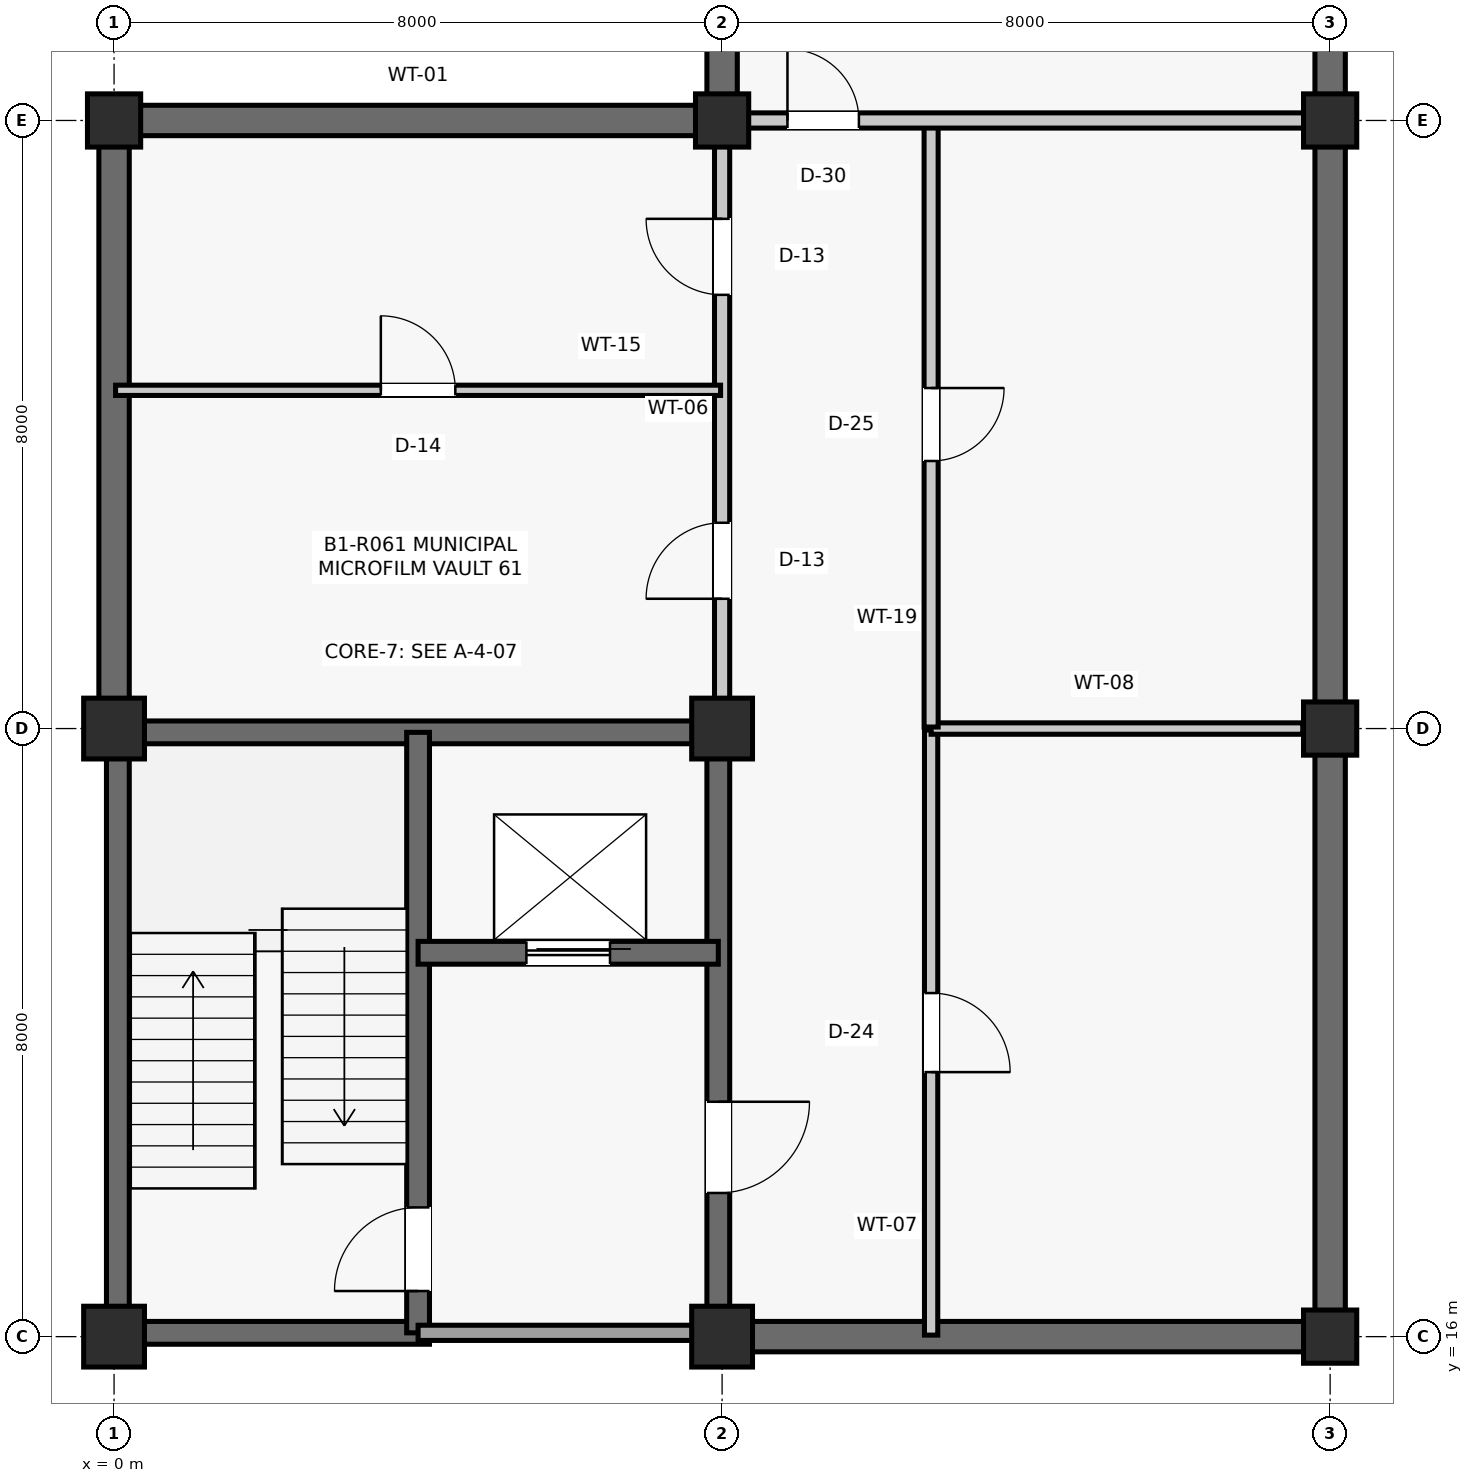
"""IFC4 building model, lengths in metres.
Left out: names, types, materials, properties, quantities, classifications, styles, units other than length and angle.
Written with IfcOpenShell. Run it as: python <this file> out.ifc"""

import sys

from ifc_helpers import new_model, si_unit, direction, frame, frame_2d, origin, origin_2d, place, context, subcontext, project, spatial, rectangle, extrude, element, fill, save


model = new_model("IFC4")
c1 = context("Model", 3, precision=1e-05, world=origin(), true_north=direction((0.0, 1.0)))
c2 = subcontext(c1, "Body", "Model", "MODEL_VIEW")
j1 = project(units=[si_unit("LENGTHUNIT", "METRE"), si_unit("PLANEANGLEUNIT", "RADIAN")], contexts=[c1])
p1 = place(None, origin())
s1 = spatial("IfcSite", under=j1, at=p1, CompositionType="ELEMENT")
p2 = place(p1, origin())
s2 = spatial("IfcBuilding", under=s1, at=p2, CompositionType="ELEMENT")
p3 = place(p2, frame((0.0, 0.0, -4.29)))
s3 = spatial("IfcBuildingStorey", under=s2, at=p3, CompositionType="ELEMENT", Elevation=-4.29)
for number, where, z_axis, x_axis in (
    (1, (0.0, 16.0, 0.0), (0.0, 0.0, 1.0), (1.0, 0.0, 0.0)),
    (2, (0.0, 24.0, 0.0), (0.0, 0.0, 1.0), (1.0, 0.0, 0.0)),
):
    element("IfcColumn", number, at=place(p3, frame(where, z_axis=z_axis, x_axis=x_axis)), inside=s3, PredefinedType="COLUMN", context=c2, shape_type="SweptSolid", body=[
        extrude(rectangle(XDim=0.8, YDim=0.8, at=origin_2d()), origin(), (0.0, 0.0, 1.0), 4.29),
    ])
p4 = place(p3, frame((0.0, 32.0, 0.0), z_axis=(0.0, 0.0, 1.0), x_axis=(1.0, 0.0, 0.0)))
e3 = element("IfcColumn", 3, at=p4, inside=s3, PredefinedType="COLUMN", context=c2, shape_type="SweptSolid", body=[
    extrude(rectangle(XDim=0.7, YDim=0.7, at=origin_2d()), origin(), (0.0, 0.0, 1.0), 4.29),
])
for number, where, z_axis, x_axis in (
    (4, (8.0, 16.0, 0.0), (0.0, 0.0, 1.0), (1.0, 0.0, 0.0)),
    (5, (8.0, 24.0, 0.0), (0.0, 0.0, 1.0), (1.0, 0.0, 0.0)),
):
    element("IfcColumn", number, at=place(p3, frame(where, z_axis=z_axis, x_axis=x_axis)), inside=s3, PredefinedType="COLUMN", context=c2, shape_type="SweptSolid", body=[
        extrude(rectangle(XDim=0.8, YDim=0.8, at=origin_2d()), origin(), (0.0, 0.0, 1.0), 4.29),
    ])
for number, where, z_axis, x_axis in (
    (6, (8.0, 32.0, 0.0), (0.0, 0.0, 1.0), (1.0, 0.0, 0.0)),
    (7, (16.0, 16.0, 0.0), (0.0, 0.0, 1.0), (1.0, 0.0, 0.0)),
    (8, (16.0, 24.0, 0.0), (0.0, 0.0, 1.0), (1.0, 0.0, 0.0)),
    (9, (16.0, 32.0, 0.0), (0.0, 0.0, 1.0), (1.0, 0.0, 0.0)),
):
    element("IfcColumn", number, at=place(p3, frame(where, z_axis=z_axis, x_axis=x_axis)), inside=s3, PredefinedType="COLUMN", context=c2, shape_type="SweptSolid", body=[
        extrude(rectangle(XDim=0.7, YDim=0.7, at=origin_2d()), origin(), (0.0, 0.0, 1.0), 4.29),
    ])
p5 = place(p3, frame((0.335, 32.0, 0.0), z_axis=(0.0, 0.0, 1.0), x_axis=(1.0, 0.0, 0.0)))
e10 = element("IfcWall", 10, at=p5, inside=s3, PredefinedType="SHEAR", context=c2, shape_type="SweptSolid", body=[
    extrude(rectangle(XDim=7.33, YDim=0.4, at=frame_2d((3.665, 0.0))), origin(), (0.0, 0.0, 1.0), 3.324),
])
p6 = place(p3, frame((0.0, 24.385, 0.0), z_axis=(0.0, 0.0, 1.0), x_axis=(0.0, 1.0, 0.0)))
e11 = element("IfcWall", 11, at=p6, inside=s3, PredefinedType="SHEAR", context=c2, shape_type="SweptSolid", body=[
    extrude(rectangle(XDim=7.28, YDim=0.4, at=frame_2d((3.64, 0.0))), origin(), (0.0, 0.0, 1.0), 3.604),
])
p7 = place(p3, frame((8.385, 16.0, 0.0), z_axis=(0.0, 0.0, 1.0), x_axis=(1.0, 0.0, 0.0)))
e12 = element("IfcWall", 12, at=p7, inside=s3, PredefinedType="SHEAR", context=c2, shape_type="SweptSolid", body=[
    extrude(rectangle(XDim=7.28, YDim=0.4, at=frame_2d((3.64, 0.0))), origin(), (0.0, 0.0, 1.0), 3.401),
])
p8 = place(p3, frame((16.0, 16.335, 0.0), z_axis=(0.0, 0.0, 1.0), x_axis=(0.0, 1.0, 0.0)))
e13 = element("IfcWall", 13, at=p8, inside=s3, PredefinedType="SHEAR", context=c2, shape_type="SweptSolid", body=[
    extrude(rectangle(XDim=7.33, YDim=0.4, at=frame_2d((3.665, 0.0))), origin(), (0.0, 0.0, 1.0), 3.4),
])
for number, where, z_axis, x_axis in (
    (14, (16.0, 24.335, 0.0), (0.0, 0.0, 1.0), (0.0, 1.0, 0.0)),
    (15, (8.0, 32.335, 0.0), (0.0, 0.0, 1.0), (0.0, 1.0, 0.0)),
):
    element("IfcWall", number, at=place(p3, frame(where, z_axis=z_axis, x_axis=x_axis)), inside=s3, PredefinedType="SHEAR", context=c2, shape_type="SweptSolid", body=[
        extrude(rectangle(XDim=7.33, YDim=0.4, at=frame_2d((3.665, 0.0))), origin(), (0.0, 0.0, 1.0), 3.409),
    ])
p9 = place(p3, frame((16.0, 32.335, 0.0), z_axis=(0.0, 0.0, 1.0), x_axis=(0.0, 1.0, 0.0)))
e16 = element("IfcWall", 16, at=p9, inside=s3, PredefinedType="SHEAR", context=c2, shape_type="SweptSolid", body=[
    extrude(rectangle(XDim=7.33, YDim=0.4, at=frame_2d((3.665, 0.0))), origin(), (0.0, 0.0, 1.0), 3.401),
])
for number, where, z_axis, x_axis in (
    (17, (0.05, 16.29, 0.0), (0.0, 0.0, 1.0), (0.0, 1.0, 0.0)),
    (18, (0.29, 23.95, 0.0), (0.0, 0.0, 1.0), (1.0, 0.0, 0.0)),
):
    element("IfcWall", number, at=place(p3, frame(where, z_axis=z_axis, x_axis=x_axis)), inside=s3, PredefinedType="SHEAR", context=c2, shape_type="SweptSolid", body=[
        extrude(rectangle(XDim=7.42, YDim=0.3, at=frame_2d((3.71, 0.0))), origin(), (0.0, 0.0, 1.0), 4.015),
    ])
p10 = place(p3, frame((7.95, 16.29, 0.0), z_axis=(0.0, 0.0, 1.0), x_axis=(0.0, 1.0, 0.0)))
e19 = element("IfcWall", 19, at=p10, inside=s3, PredefinedType="SHEAR", context=c2, shape_type="SweptSolid", body=[
    extrude(rectangle(XDim=7.42, YDim=0.3, at=frame_2d((3.71, 0.0))), origin(), (0.0, 0.0, 1.0), 4.015),
])
p11 = place(p10, frame((1.6, 0.0, 0.0)))
e20 = element("IfcOpeningElement", 20, at=p11, cuts=e19, PredefinedType="OPENING", context=c2, shape_type="SweptSolid", body=[
    extrude(rectangle(XDim=1.2, YDim=2.15, at=frame_2d((0.6, 1.075))), frame((0.0, 0.16, 0.0), z_axis=(0.0, -1.0, 0.0), x_axis=(1.0, 0.0, 0.0)), (0.0, 0.0, 1.0), 0.32),
])
p12 = place(p3, frame((0.29, 16.05, 0.0), z_axis=(0.0, 0.0, 1.0), x_axis=(1.0, 0.0, 0.0)))
e21 = element("IfcWall", 21, at=p12, inside=s3, PredefinedType="SHEAR", context=c2, shape_type="SweptSolid", body=[
    extrude(rectangle(XDim=3.86, YDim=0.3, at=frame_2d((1.93, 0.0))), origin(), (0.0, 0.0, 1.0), 4.015),
])
p13 = place(p3, frame((4.0, 16.05, 0.0), z_axis=(0.0, 0.0, 1.0), x_axis=(0.0, 1.0, 0.0)))
e22 = element("IfcWall", 22, at=p13, inside=s3, PredefinedType="SHEAR", context=c2, shape_type="SweptSolid", body=[
    extrude(rectangle(XDim=7.9, YDim=0.3, at=frame_2d((3.95, 0.0))), origin(), (0.0, 0.0, 1.0), 4.015),
])
p14 = place(p13, frame((0.55, 0.0, 0.0)))
e23 = element("IfcOpeningElement", 23, at=p14, cuts=e22, PredefinedType="OPENING", context=c2, shape_type="SweptSolid", body=[
    extrude(rectangle(XDim=1.1, YDim=2.15, at=frame_2d((0.55, 1.075))), frame((0.0, 0.16, 0.0), z_axis=(0.0, -1.0, 0.0), x_axis=(1.0, 0.0, 0.0)), (0.0, 0.0, 1.0), 0.32),
])
p15 = place(p3, frame((4.0, 21.05, 0.0), z_axis=(0.0, 0.0, 1.0), x_axis=(1.0, 0.0, 0.0)))
e24 = element("IfcWall", 24, at=p15, inside=s3, PredefinedType="SHEAR", context=c2, shape_type="SweptSolid", body=[
    extrude(rectangle(XDim=3.95, YDim=0.3, at=frame_2d((1.975, 0.0))), origin(), (0.0, 0.0, 1.0), 4.015),
])
p16 = place(p15, frame((1.425, 0.0, 0.0)))
e25 = element("IfcOpeningElement", 25, at=p16, cuts=e24, PredefinedType="OPENING", context=c2, shape_type="SweptSolid", body=[
    extrude(rectangle(XDim=1.1, YDim=2.2, at=frame_2d((0.55, 1.1))), frame((0.0, 0.16, 0.0), z_axis=(0.0, -1.0, 0.0), x_axis=(1.0, 0.0, 0.0)), (0.0, 0.0, 1.0), 0.32),
])
p17 = place(p3, frame((4.0, 16.05, 0.0), z_axis=(0.0, 0.0, 1.0), x_axis=(1.0, 0.0, 0.0)))
e26 = element("IfcWall", 26, at=p17, inside=s3, PredefinedType="PARTITIONING", context=c2, shape_type="SweptSolid", body=[
    extrude(rectangle(XDim=3.61, YDim=0.2, at=frame_2d((1.805, 0.0))), origin(), (0.0, 0.0, 1.0), 3.326),
])
p18 = place(p3, frame((10.75, 16.02, 0.0), z_axis=(0.0, 0.0, 1.0), x_axis=(0.0, 1.0, 0.0)))
e27 = element("IfcWall", 27, at=p18, inside=s3, PredefinedType="PARTITIONING", context=c2, shape_type="SweptSolid", body=[
    extrude(rectangle(XDim=7.96, YDim=0.175, at=frame_2d((3.98, 0.0))), origin(), (0.0, 0.0, 1.0), 3.317),
])
p19 = place(p18, frame((3.46, 0.0, 0.0)))
e28 = element("IfcOpeningElement", 28, at=p19, cuts=e27, PredefinedType="OPENING", context=c2, shape_type="SweptSolid", body=[
    extrude(rectangle(XDim=1.04, YDim=2.18, at=frame_2d((0.52, 1.09))), frame((0.0, 0.097, 0.0), z_axis=(0.0, -1.0, 0.0), x_axis=(1.0, 0.0, 0.0)), (0.0, 0.0, 1.0), 0.195),
])
p20 = place(p3, frame((10.75, 24.0, 0.0), z_axis=(0.0, 0.0, 1.0), x_axis=(1.0, 0.0, 0.0)))
e29 = element("IfcWall", 29, at=p20, inside=s3, PredefinedType="PARTITIONING", context=c2, shape_type="SweptSolid", body=[
    extrude(rectangle(XDim=4.89, YDim=0.15, at=frame_2d((2.445, 0.0))), origin(), (0.0, 0.0, 1.0), 3.317),
])
p21 = place(p3, frame((10.75, 24.02, 0.0), z_axis=(0.0, 0.0, 1.0), x_axis=(0.0, 1.0, 0.0)))
e30 = element("IfcWall", 30, at=p21, inside=s3, PredefinedType="PARTITIONING", context=c2, shape_type="SweptSolid", body=[
    extrude(rectangle(XDim=7.96, YDim=0.185, at=frame_2d((3.98, 0.0))), origin(), (0.0, 0.0, 1.0), 3.317),
])
p22 = place(p21, frame((3.5, 0.0, 0.0)))
e31 = element("IfcOpeningElement", 31, at=p22, cuts=e30, PredefinedType="OPENING", context=c2, shape_type="SweptSolid", body=[
    extrude(rectangle(XDim=0.96, YDim=2.14, at=frame_2d((0.48, 1.07))), frame((0.0, 0.103, 0.0), z_axis=(0.0, -1.0, 0.0), x_axis=(1.0, 0.0, 0.0)), (0.0, 0.0, 1.0), 0.205),
])
p23 = place(p3, frame((8.0, 24.39, 0.0), z_axis=(0.0, 0.0, 1.0), x_axis=(0.0, 1.0, 0.0)))
e32 = element("IfcWall", 32, at=p23, inside=s3, PredefinedType="PARTITIONING", context=c2, shape_type="SweptSolid", body=[
    extrude(rectangle(XDim=7.27, YDim=0.2, at=frame_2d((3.635, 0.0))), origin(), (0.0, 0.0, 1.0), 3.393),
])
p24 = place(p23, frame((1.317, 0.0, 0.0)))
e33 = element("IfcOpeningElement", 33, at=p24, cuts=e32, PredefinedType="OPENING", context=c2, shape_type="SweptSolid", body=[
    extrude(rectangle(XDim=1.0, YDim=2.15, at=frame_2d((0.5, 1.075))), frame((0.0, 0.11, 0.0), z_axis=(0.0, -1.0, 0.0), x_axis=(1.0, 0.0, 0.0)), (0.0, 0.0, 1.0), 0.22),
])
p25 = place(p23, frame((5.316, 0.0, 0.0)))
e34 = element("IfcOpeningElement", 34, at=p25, cuts=e32, PredefinedType="OPENING", context=c2, shape_type="SweptSolid", body=[
    extrude(rectangle(XDim=1.0, YDim=2.15, at=frame_2d((0.5, 1.075))), frame((0.0, 0.11, 0.0), z_axis=(0.0, -1.0, 0.0), x_axis=(1.0, 0.0, 0.0)), (0.0, 0.0, 1.0), 0.22),
])
p26 = place(p3, frame((8.34, 32.0, 0.0), z_axis=(0.0, 0.0, 1.0), x_axis=(1.0, 0.0, 0.0)))
e35 = element("IfcWall", 35, at=p26, inside=s3, PredefinedType="PARTITIONING", context=c2, shape_type="SweptSolid", body=[
    extrude(rectangle(XDim=7.32, YDim=0.2, at=frame_2d((3.66, 0.0))), origin(), (0.0, 0.0, 1.0), 3.393),
])
p27 = place(p26, frame((0.52, 0.0, 0.0)))
e36 = element("IfcOpeningElement", 36, at=p27, cuts=e35, PredefinedType="OPENING", context=c2, shape_type="SweptSolid", body=[
    extrude(rectangle(XDim=0.94, YDim=2.12, at=frame_2d((0.47, 1.06))), frame((0.0, 0.11, 0.0), z_axis=(0.0, -1.0, 0.0), x_axis=(1.0, 0.0, 0.0)), (0.0, 0.0, 1.0), 0.22),
])
p28 = place(p3, frame((0.02, 28.45, 0.0), z_axis=(0.0, 0.0, 1.0), x_axis=(1.0, 0.0, 0.0)))
e37 = element("IfcWall", 37, at=p28, inside=s3, PredefinedType="PARTITIONING", context=c2, shape_type="SweptSolid", body=[
    extrude(rectangle(XDim=7.96, YDim=0.135, at=frame_2d((3.98, 0.0))), origin(), (0.0, 0.0, 1.0), 3.393),
])
p29 = place(p28, frame((3.49, 0.0, 0.0)))
e38 = element("IfcOpeningElement", 38, at=p29, cuts=e37, PredefinedType="OPENING", context=c2, shape_type="SweptSolid", body=[
    extrude(rectangle(XDim=0.98, YDim=2.15, at=frame_2d((0.49, 1.075))), frame((0.0, 0.077, 0.0), z_axis=(0.0, -1.0, 0.0), x_axis=(1.0, 0.0, 0.0)), (0.0, 0.0, 1.0), 0.155),
])
p30 = place(p14, origin())
e39 = element("IfcDoor", 39, at=p30, inside=s3, OperationType="SINGLE_SWING_LEFT", PredefinedType="DOOR", context=c2, shape_type="SweptSolid", body=[
    extrude(rectangle(XDim=1.1, YDim=2.15, at=frame_2d((0.55, 1.075))), frame((0.0, 0.025, 0.0), z_axis=(0.0, -1.0, 0.0), x_axis=(1.0, 0.0, 0.0)), (0.0, 0.0, 1.0), 0.05),
])
fill(e23, e39)
p31 = place(p16, origin())
e40 = element("IfcDoor", 40, at=p31, inside=s3, OperationType="SLIDING_TO_LEFT", PredefinedType="DOOR", context=c2, shape_type="SweptSolid", body=[
    extrude(rectangle(XDim=1.1, YDim=2.2, at=frame_2d((0.55, 1.1))), frame((0.0, 0.025, 0.0), z_axis=(0.0, -1.0, 0.0), x_axis=(1.0, 0.0, 0.0)), (0.0, 0.0, 1.0), 0.05),
])
fill(e25, e40)
p32 = place(p11, frame((1.2, 0.0, 0.0), z_axis=(0.0, 0.0, 1.0), x_axis=(-1.0, 0.0, 0.0)))
e41 = element("IfcDoor", 41, at=p32, inside=s3, OperationType="SINGLE_SWING_RIGHT", PredefinedType="DOOR", context=c2, shape_type="SweptSolid", body=[
    extrude(rectangle(XDim=1.2, YDim=2.15, at=frame_2d((0.6, 1.075))), frame((0.0, 0.025, 0.0), z_axis=(0.0, -1.0, 0.0), x_axis=(1.0, 0.0, 0.0)), (0.0, 0.0, 1.0), 0.05),
])
fill(e20, e41)
p33 = place(p19, frame((1.04, 0.0, 0.0), z_axis=(0.0, 0.0, 1.0), x_axis=(-1.0, 0.0, 0.0)))
e42 = element("IfcDoor", 42, at=p33, inside=s3, OperationType="SINGLE_SWING_LEFT", PredefinedType="DOOR", context=c2, shape_type="SweptSolid", body=[
    extrude(rectangle(XDim=1.04, YDim=2.18, at=frame_2d((0.52, 1.09))), frame((0.0, 0.025, 0.0), z_axis=(0.0, -1.0, 0.0), x_axis=(1.0, 0.0, 0.0)), (0.0, 0.0, 1.0), 0.05),
])
fill(e28, e42)
p34 = place(p22, frame((0.96, 0.0, 0.0), z_axis=(0.0, 0.0, 1.0), x_axis=(-1.0, 0.0, 0.0)))
e43 = element("IfcDoor", 43, at=p34, inside=s3, OperationType="SINGLE_SWING_RIGHT", PredefinedType="DOOR", context=c2, shape_type="SweptSolid", body=[
    extrude(rectangle(XDim=0.96, YDim=2.14, at=frame_2d((0.48, 1.07))), frame((0.0, 0.025, 0.0), z_axis=(0.0, -1.0, 0.0), x_axis=(1.0, 0.0, 0.0)), (0.0, 0.0, 1.0), 0.05),
])
fill(e31, e43)
p35 = place(p24, origin())
e44 = element("IfcDoor", 44, at=p35, inside=s3, OperationType="SINGLE_SWING_LEFT", PredefinedType="DOOR", context=c2, shape_type="SweptSolid", body=[
    extrude(rectangle(XDim=1.0, YDim=2.15, at=frame_2d((0.5, 1.075))), frame((0.0, 0.025, 0.0), z_axis=(0.0, -1.0, 0.0), x_axis=(1.0, 0.0, 0.0)), (0.0, 0.0, 1.0), 0.05),
])
fill(e33, e44)
p36 = place(p25, origin())
e45 = element("IfcDoor", 45, at=p36, inside=s3, OperationType="SINGLE_SWING_RIGHT", PredefinedType="DOOR", context=c2, shape_type="SweptSolid", body=[
    extrude(rectangle(XDim=1.0, YDim=2.15, at=frame_2d((0.5, 1.075))), frame((0.0, 0.025, 0.0), z_axis=(0.0, -1.0, 0.0), x_axis=(1.0, 0.0, 0.0)), (0.0, 0.0, 1.0), 0.05),
])
fill(e34, e45)
p37 = place(p27, origin())
e46 = element("IfcDoor", 46, at=p37, inside=s3, OperationType="SINGLE_SWING_LEFT", PredefinedType="DOOR", context=c2, shape_type="SweptSolid", body=[
    extrude(rectangle(XDim=0.94, YDim=2.12, at=frame_2d((0.47, 1.06))), frame((0.0, 0.025, 0.0), z_axis=(0.0, -1.0, 0.0), x_axis=(1.0, 0.0, 0.0)), (0.0, 0.0, 1.0), 0.05),
])
fill(e36, e46)
p38 = place(p29, origin())
e47 = element("IfcDoor", 47, at=p38, inside=s3, OperationType="SINGLE_SWING_LEFT", PredefinedType="DOOR", context=c2, shape_type="SweptSolid", body=[
    extrude(rectangle(XDim=0.98, YDim=2.15, at=frame_2d((0.49, 1.075))), frame((0.0, 0.025, 0.0), z_axis=(0.0, -1.0, 0.0), x_axis=(1.0, 0.0, 0.0)), (0.0, 0.0, 1.0), 0.05),
])
fill(e38, e47)
save(model, sys.argv[1])
